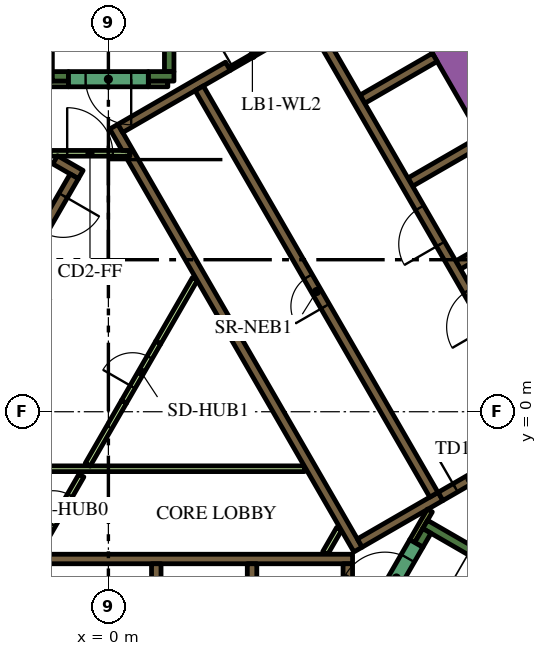
"""IFC4 building model, lengths in metres.
Left out: names, types, materials, properties, quantities, classifications, styles, units other than length and angle.
Written with IfcOpenShell. Run it as: python <this file> out.ifc"""

import sys

from ifc_helpers import new_model, si_unit, direction, frame, frame_2d, origin, place, context, subcontext, project, spatial, polyline, rectangle, outline, extrude, element, fill, save


model = new_model("IFC4")
c1 = context("Model", 3, precision=1e-05, world=origin(), true_north=direction((0.0, 1.0)))
c2 = subcontext(c1, "Body", "Model", "MODEL_VIEW")
j1 = project(units=[si_unit("LENGTHUNIT", "METRE"), si_unit("PLANEANGLEUNIT", "RADIAN")], contexts=[c1])
p1 = place(None, origin())
s1 = spatial("IfcSite", under=j1, at=p1, CompositionType="ELEMENT")
p2 = place(p1, origin())
s2 = spatial("IfcBuilding", under=s1, at=p2, CompositionType="ELEMENT")
p3 = place(p2, frame((0.0, 0.0, 99.3)))
s3 = spatial("IfcBuildingStorey", under=s2, at=p3, CompositionType="ELEMENT", Elevation=99.3)
p4 = place(p3, frame((6.776, 13.364, 0.0), z_axis=(0.0, 0.0, 1.0), x_axis=(0.500004177138, -0.8660229921, 0.0)))
e1 = element("IfcWall", 1, at=p4, inside=s3, PredefinedType="SOLIDWALL", context=c2, shape_type="SweptSolid", body=[
    extrude(rectangle(XDim=20.204, YDim=0.9, at=frame_2d((10.102, 0.0))), origin(), (0.0, 0.0, 1.0), 3.9),
])
p5 = place(p3, frame((8.334, -2.964, 0.0), z_axis=(0.0, 0.0, 1.0), x_axis=(0.866016039709, -0.500016218704, 0.0)))
e2 = element("IfcWall", 2, at=p5, inside=s3, PredefinedType="SOLIDWALL", context=c2, shape_type="SweptSolid", body=[
    extrude(rectangle(XDim=7.05, YDim=0.25, at=frame_2d((3.525, 0.0))), origin(), (0.0, 0.0, 1.0), 3.9),
])
p6 = place(p3, frame((8.168, -3.503, 0.0), z_axis=(0.0, 0.0, 1.0), x_axis=(0.49972245349, 0.866185586049, 0.0)))
e3 = element("IfcWall", 3, at=p6, inside=s3, PredefinedType="SOLIDWALL", context=c2, shape_type="SweptSolid", body=[
    extrude(rectangle(XDim=0.425, YDim=0.25, at=frame_2d((0.212, 0.0))), origin(), (0.0, 0.0, 1.0), 3.9),
])
p7 = place(p3, frame((1.6, 8.95, 0.0), z_axis=(0.0, 0.0, 1.0), x_axis=(0.0, 1.0, 0.0)))
e4 = element("IfcWall", 4, at=p7, inside=s3, PredefinedType="SOLIDWALL", context=c2, shape_type="SweptSolid", body=[
    extrude(rectangle(XDim=6.8, YDim=0.25, at=frame_2d((3.4, 0.0))), origin(), (0.0, 0.0, 1.0), 3.9),
])
p8 = place(p3, frame((1.05, 8.825, 0.0), z_axis=(0.0, 0.0, 1.0), x_axis=(1.0, 0.0, 0.0)))
e5 = element("IfcWall", 5, at=p8, inside=s3, PredefinedType="SOLIDWALL", context=c2, shape_type="SweptSolid", body=[
    extrude(rectangle(XDim=0.675, YDim=0.25, at=frame_2d((0.337, 0.0))), origin(), (0.0, 0.0, 1.0), 3.9),
])
p9 = place(p3, frame((-1.6, 8.7, 0.0), z_axis=(0.0, 0.0, 1.0), x_axis=(0.0, 1.0, 0.0)))
e6 = element("IfcWall", 6, at=p9, inside=s3, PredefinedType="SOLIDWALL", context=c2, shape_type="SweptSolid", body=[
    extrude(rectangle(XDim=7.05, YDim=0.25, at=frame_2d((3.525, 0.0))), origin(), (0.0, 0.0, 1.0), 3.9),
])
p10 = place(p3, frame((-1.475, 8.825, 0.0), z_axis=(0.0, 0.0, 1.0), x_axis=(1.0, 0.0, 0.0)))
e7 = element("IfcWall", 7, at=p10, inside=s3, PredefinedType="SOLIDWALL", context=c2, shape_type="SweptSolid", body=[
    extrude(rectangle(XDim=0.425, YDim=0.25, at=frame_2d((0.212, 0.0))), origin(), (0.0, 0.0, 1.0), 3.9),
])
p11 = place(p3, frame((-5.545, -3.875, 0.0), z_axis=(0.0, 0.0, 1.0), x_axis=(1.0, 0.0, 0.0)))
e8 = element("IfcWall", 8, at=p11, inside=s3, PredefinedType="SOLIDWALL", context=c2, shape_type="SweptSolid", body=[
    extrude(rectangle(XDim=11.97, YDim=0.25, at=frame_2d((5.985, 0.0))), origin(), (0.0, 0.0, 1.0), 3.9),
])
p12 = place(p3, frame((6.3, -7.268, 0.0), z_axis=(0.0, 0.0, 1.0), x_axis=(0.0, 1.0, 0.0)))
e9 = element("IfcWall", 9, at=p12, inside=s3, PredefinedType="SOLIDWALL", context=c2, shape_type="SweptSolid", body=[
    extrude(rectangle(XDim=3.268, YDim=0.25, at=frame_2d((1.634, 0.0))), origin(), (0.0, 0.0, 1.0), 3.9),
])
for number, where, z_axis, x_axis in (
    (10, (3.78, -4.0, 0.0), (0.0, 0.0, 1.0), (0.0, -1.0, 0.0)),
    (11, (1.26, -4.0, 0.0), (0.0, 0.0, 1.0), (0.0, -1.0, 0.0)),
):
    element("IfcWall", number, at=place(p3, frame(where, z_axis=z_axis, x_axis=x_axis)), inside=s3, PredefinedType="SOLIDWALL", context=c2, shape_type="SweptSolid", body=[
        extrude(rectangle(XDim=2.2, YDim=0.25, at=frame_2d((1.1, 0.0))), origin(), (0.0, 0.0, 1.0), 3.9),
    ])
p13 = place(p3, origin())
e12 = element("IfcWall", 12, at=p13, inside=s3, PredefinedType="SOLIDWALL", context=c2, shape_type="SweptSolid", body=[
    extrude(outline(polyline([(0.566, 6.725), (0.566, 6.875), (0.566, 6.875), (0.565, 6.875), (0.361, 6.875), (0.035, 7.439), (0.252, 7.564), (0.377, 7.348), (6.552, -3.348), (6.677, -3.564), (6.46, -3.689), (0.448, 6.725), (0.565, 6.725), (0.566, 6.725), (0.566, 6.725)])), origin(), (0.0, 0.0, 1.0), 3.9),
])
p14 = place(p3, frame((0.314, 7.456, 0.0), z_axis=(0.0, 0.0, 1.0), x_axis=(0.866013897511, 0.50001992892, 0.0)))
e13 = element("IfcWall", 13, at=p14, inside=s3, PredefinedType="SOLIDWALL", context=c2, shape_type="SweptSolid", body=[
    extrude(rectangle(XDim=3.268, YDim=0.25, at=frame_2d((1.634, 0.0))), origin(), (0.0, 0.0, 1.0), 3.9),
])
p15 = place(p3, frame((6.614, -3.456, 0.0), z_axis=(0.0, 0.0, 1.0), x_axis=(0.866031582473, 0.499989298045, 0.0)))
e14 = element("IfcWall", 14, at=p15, inside=s3, PredefinedType="SOLIDWALL", context=c2, shape_type="SweptSolid", body=[
    extrude(rectangle(XDim=2.455, YDim=0.25, at=frame_2d((1.228, 0.0))), origin(), (0.0, 0.0, 1.0), 3.9),
])
for number, where, z_axis, x_axis in (
    (15, (6.684, 8.224, 0.0), (0.0, 0.0, 1.0), (0.866, 0.5, 0.0)),
    (16, (7.944, 6.041, 0.0), (0.0, 0.0, 1.0), (0.866, 0.5, 0.0)),
    (17, (9.204, 3.859, 0.0), (0.0, 0.0, 1.0), (0.866, 0.5, 0.0)),
):
    element("IfcWall", number, at=place(p3, frame(where, z_axis=z_axis, x_axis=x_axis)), inside=s3, PredefinedType="SOLIDWALL", context=c2, shape_type="SweptSolid", body=[
        extrude(rectangle(XDim=2.2, YDim=0.25, at=frame_2d((1.1, 0.0))), origin(), (0.0, 0.0, 1.0), 3.9),
    ])
p16 = place(p3, frame((-0.728, 6.24, 0.0), z_axis=(0.0, 0.0, 1.0), x_axis=(-0.865955664968, 0.500120771724, 0.0)))
e18 = element("IfcWall", 18, at=p16, inside=s3, PredefinedType="SOLIDWALL", context=c2, shape_type="SweptSolid", body=[
    extrude(rectangle(XDim=0.778, YDim=0.25, at=frame_2d((0.389, 0.0))), origin(), (0.0, 0.0, 1.0), 3.9),
])
p17 = place(p3, frame((-2.196, 8.625, 0.0), z_axis=(0.0, 0.0, 1.0), x_axis=(1.0, 0.0, 0.0)))
e19 = element("IfcWall", 19, at=p17, inside=s3, PredefinedType="PARTITIONING", context=c2, shape_type="SweptSolid", body=[
    extrude(rectangle(XDim=1.146, YDim=0.15, at=frame_2d((0.573, 0.0))), origin(), (0.0, 0.0, 1.0), 2.75),
])
p18 = place(p3, frame((5.705, -3.718, 0.0), z_axis=(0.0, 0.0, 1.0), x_axis=(0.499962090823, 0.866047289552, 0.0)))
e20 = element("IfcWall", 20, at=p18, inside=s3, PredefinedType="PARTITIONING", context=c2, shape_type="SweptSolid", body=[
    extrude(rectangle(XDim=0.735, YDim=0.15, at=frame_2d((0.367, 0.0))), origin(), (0.0, 0.0, 1.0), 2.75),
])
p19 = place(p3, frame((8.459, -2.599, 0.0), z_axis=(0.0, 0.0, 1.0), x_axis=(-0.500041054325, -0.866001699761, 0.0)))
e21 = element("IfcWall", 21, at=p19, inside=s3, PredefinedType="PARTITIONING", context=c2, shape_type="SweptSolid", body=[
    extrude(rectangle(XDim=0.929, YDim=0.15, at=frame_2d((0.464, 0.0))), origin(), (0.0, 0.0, 1.0), 3.9),
])
p20 = place(p3, frame((-4.2, -1.5, 0.0), z_axis=(0.0, 0.0, 1.0), x_axis=(1.0, 0.0, 0.0)))
e22 = element("IfcWall", 22, at=p20, inside=s3, PredefinedType="PARTITIONING", context=c2, shape_type="SweptSolid", body=[
    extrude(rectangle(XDim=9.359, YDim=0.15, at=frame_2d((4.68, 0.0))), origin(), (0.0, 0.0, 1.0), 2.75),
])
p21 = place(p3, frame((-0.544, -1.393, 0.0), z_axis=(0.0, 0.0, 1.0), x_axis=(0.499928740635, 0.866066541489, 0.0)))
e23 = element("IfcWall", 23, at=p21, inside=s3, PredefinedType="PARTITIONING", context=c2, shape_type="SweptSolid", body=[
    extrude(rectangle(XDim=1.912, YDim=0.15, at=frame_2d((0.956, 0.0))), origin(), (0.0, 0.0, 1.0), 2.75),
])
p22 = place(p3, frame((1.312, 1.822, 0.0), z_axis=(0.0, 0.0, 1.0), x_axis=(0.500003549559, 0.866023354436, 0.0)))
e24 = element("IfcWall", 24, at=p22, inside=s3, PredefinedType="PARTITIONING", context=c2, shape_type="SweptSolid", body=[
    extrude(rectangle(XDim=1.93, YDim=0.15, at=frame_2d((0.965, 0.0))), origin(), (0.0, 0.0, 1.0), 2.75),
])
p23 = place(p3, frame((1.05, 8.625, 0.0), z_axis=(0.0, 0.0, 1.0), x_axis=(1.0, 0.0, 0.0)))
e25 = element("IfcWall", 25, at=p23, inside=s3, PredefinedType="PARTITIONING", context=c2, shape_type="SweptSolid", body=[
    extrude(rectangle(XDim=0.514, YDim=0.15, at=frame_2d((0.257, 0.0))), origin(), (0.0, 0.0, 1.0), 2.75),
])
p24 = place(p3, frame((11.553, -0.46, 0.0), z_axis=(0.0, 0.0, 1.0), x_axis=(-0.500006514828, 0.866021642414, 0.0)))
e26 = element("IfcWall", 26, at=p24, inside=s3, PredefinedType="SOLIDWALL", context=c2, shape_type="SweptSolid", body=[
    extrude(rectangle(XDim=12.35, YDim=0.25, at=frame_2d((6.175, 0.0))), origin(), (0.0, 0.0, 1.0), 3.9),
])
p25 = place(p24, frame((0.585, 0.0, 0.0)))
e27 = element("IfcOpeningElement", 27, at=p25, cuts=e26, PredefinedType="OPENING", context=c2, shape_type="SweptSolid", body=[
    extrude(rectangle(XDim=1.1, YDim=2.1, at=frame_2d((0.55, 1.05))), frame((0.0, 0.135, 0.0), z_axis=(0.0, -1.0, 0.0), x_axis=(1.0, 0.0, 0.0)), (0.0, 0.0, 1.0), 0.27),
])
p26 = place(p24, frame((3.105, 0.0, 0.0)))
e28 = element("IfcOpeningElement", 28, at=p26, cuts=e26, PredefinedType="OPENING", context=c2, shape_type="SweptSolid", body=[
    extrude(rectangle(XDim=1.1, YDim=2.1, at=frame_2d((0.55, 1.05))), frame((0.0, 0.135, 0.0), z_axis=(0.0, -1.0, 0.0), x_axis=(1.0, 0.0, 0.0)), (0.0, 0.0, 1.0), 0.27),
])
p27 = place(p24, frame((5.625, 0.0, 0.0)))
e29 = element("IfcOpeningElement", 29, at=p27, cuts=e26, PredefinedType="OPENING", context=c2, shape_type="SweptSolid", body=[
    extrude(rectangle(XDim=1.1, YDim=2.1, at=frame_2d((0.55, 1.05))), frame((0.0, 0.135, 0.0), z_axis=(0.0, -1.0, 0.0), x_axis=(1.0, 0.0, 0.0)), (0.0, 0.0, 1.0), 0.27),
])
p28 = place(p3, frame((8.565, -2.185, 0.0), z_axis=(0.0, 0.0, 1.0), x_axis=(-0.499997954832, 0.866026584559, 0.0)))
e30 = element("IfcWall", 30, at=p28, inside=s3, PredefinedType="SOLIDWALL", context=c2, shape_type="SweptSolid", body=[
    extrude(rectangle(XDim=12.35, YDim=0.25, at=frame_2d((6.175, 0.0))), origin(), (0.0, 0.0, 1.0), 3.9),
])
p29 = place(p28, frame((5.725, 0.0, 0.0)))
e31 = element("IfcOpeningElement", 31, at=p29, cuts=e30, PredefinedType="OPENING", context=c2, shape_type="SweptSolid", body=[
    extrude(rectangle(XDim=0.9, YDim=2.1, at=frame_2d((0.45, 1.05))), frame((0.0, 0.135, 0.0), z_axis=(0.0, -1.0, 0.0), x_axis=(1.0, 0.0, 0.0)), (0.0, 0.0, 1.0), 0.27),
])
p30 = place(p3, frame((-0.898, 6.194, 0.0), z_axis=(0.0, 0.0, 1.0), x_axis=(-0.499996202215, -0.866027596426, 0.0)))
e32 = element("IfcWall", 32, at=p30, inside=s3, PredefinedType="SOLIDWALL", context=c2, shape_type="SweptSolid", body=[
    extrude(rectangle(XDim=9.83, YDim=0.25, at=frame_2d((4.915, 0.0))), origin(), (0.0, 0.0, 1.0), 3.9),
])
p31 = place(p30, frame((0.585, 0.0, 0.0)))
e33 = element("IfcOpeningElement", 33, at=p31, cuts=e32, PredefinedType="OPENING", context=c2, shape_type="SweptSolid", body=[
    extrude(rectangle(XDim=1.1, YDim=2.1, at=frame_2d((0.55, 1.05))), frame((0.0, 0.135, 0.0), z_axis=(0.0, -1.0, 0.0), x_axis=(1.0, 0.0, 0.0)), (0.0, 0.0, 1.0), 0.27),
])
p32 = place(p30, frame((3.105, 0.0, 0.0)))
e34 = element("IfcOpeningElement", 34, at=p32, cuts=e32, PredefinedType="OPENING", context=c2, shape_type="SweptSolid", body=[
    extrude(rectangle(XDim=1.1, YDim=2.1, at=frame_2d((0.55, 1.05))), frame((0.0, 0.135, 0.0), z_axis=(0.0, -1.0, 0.0), x_axis=(1.0, 0.0, 0.0)), (0.0, 0.0, 1.0), 0.27),
])
p33 = place(p30, frame((5.625, 0.0, 0.0)))
e35 = element("IfcOpeningElement", 35, at=p33, cuts=e32, PredefinedType="OPENING", context=c2, shape_type="SweptSolid", body=[
    extrude(rectangle(XDim=1.1, YDim=2.1, at=frame_2d((0.55, 1.05))), frame((0.0, 0.135, 0.0), z_axis=(0.0, -1.0, 0.0), x_axis=(1.0, 0.0, 0.0)), (0.0, 0.0, 1.0), 0.27),
])
p34 = place(p30, frame((8.145, 0.0, 0.0)))
e36 = element("IfcOpeningElement", 36, at=p34, cuts=e32, PredefinedType="OPENING", context=c2, shape_type="SweptSolid", body=[
    extrude(rectangle(XDim=1.1, YDim=2.1, at=frame_2d((0.55, 1.05))), frame((0.0, 0.135, 0.0), z_axis=(0.0, -1.0, 0.0), x_axis=(1.0, 0.0, 0.0)), (0.0, 0.0, 1.0), 0.27),
])
p35 = place(p3, frame((7.053, -5.284, 0.0), z_axis=(0.0, 0.0, 1.0), x_axis=(0.500078061341, 0.865980330357, 0.0)))
e37 = element("IfcWall", 37, at=p35, inside=s3, PredefinedType="SOLIDWALL", context=c2, shape_type="SweptSolid", body=[
    extrude(rectangle(XDim=2.1, YDim=0.4, at=frame_2d((1.05, 0.0))), origin(), (0.0, 0.0, 1.0), 3.9),
])
p36 = place(p35, frame((0.45, 0.0, 0.0)))
e38 = element("IfcOpeningElement", 38, at=p36, cuts=e37, PredefinedType="OPENING", context=c2, shape_type="SweptSolid", body=[
    extrude(rectangle(XDim=1.2, YDim=2.1, at=frame_2d((0.6, 1.05))), frame((0.0, 0.21, 0.0), z_axis=(0.0, -1.0, 0.0), x_axis=(1.0, 0.0, 0.0)), (0.0, 0.0, 1.0), 0.42),
])
p37 = place(p3, frame((8.74, -2.229, 0.0), z_axis=(0.0, 0.0, 1.0), x_axis=(0.865989075817, 0.500062916607, 0.0)))
e39 = element("IfcWall", 39, at=p37, inside=s3, PredefinedType="SOLIDWALL", context=c2, shape_type="SweptSolid", body=[
    extrude(rectangle(XDim=1.8, YDim=0.25, at=frame_2d((0.9, 0.0))), origin(), (0.0, 0.0, 1.0), 3.9),
])
p38 = place(p37, frame((0.45, 0.0, 0.0)))
e40 = element("IfcOpeningElement", 40, at=p38, cuts=e39, PredefinedType="OPENING", context=c2, shape_type="SweptSolid", body=[
    extrude(rectangle(XDim=0.9, YDim=2.1, at=frame_2d((0.45, 1.05))), frame((0.0, 0.135, 0.0), z_axis=(0.0, -1.0, 0.0), x_axis=(1.0, 0.0, 0.0)), (0.0, 0.0, 1.0), 0.27),
])
p39 = place(p3, frame((1.05, 8.75, 0.0), z_axis=(0.0, 0.0, 1.0), x_axis=(-1.0, 0.0, 0.0)))
e41 = element("IfcWall", 41, at=p39, inside=s3, PredefinedType="SOLIDWALL", context=c2, shape_type="SweptSolid", body=[
    extrude(rectangle(XDim=2.1, YDim=0.4, at=frame_2d((1.05, 0.0))), origin(), (0.0, 0.0, 1.0), 3.9),
])
p40 = place(p39, frame((0.45, 0.0, 0.0)))
e42 = element("IfcOpeningElement", 42, at=p40, cuts=e41, PredefinedType="OPENING", context=c2, shape_type="SweptSolid", body=[
    extrude(rectangle(XDim=1.2, YDim=2.1, at=frame_2d((0.6, 1.05))), frame((0.0, 0.21, 0.0), z_axis=(0.0, -1.0, 0.0), x_axis=(1.0, 0.0, 0.0)), (0.0, 0.0, 1.0), 0.42),
])
p41 = place(p3, frame((-1.76, -3.498, 0.0), z_axis=(0.0, 0.0, 1.0), x_axis=(0.499977374825, 0.866038466041, 0.0)))
e43 = element("IfcWall", 43, at=p41, inside=s3, PredefinedType="PARTITIONING", context=c2, shape_type="SweptSolid", body=[
    extrude(rectangle(XDim=2.1, YDim=0.15, at=frame_2d((1.05, 0.0))), origin(), (0.0, 0.0, 1.0), 2.75),
])
p42 = place(p41, frame((0.6, 0.0, 0.0)))
e44 = element("IfcOpeningElement", 44, at=p42, cuts=e43, PredefinedType="OPENING", context=c2, shape_type="SweptSolid", body=[
    extrude(rectangle(XDim=0.9, YDim=2.1, at=frame_2d((0.45, 1.05))), frame((0.0, 0.085, 0.0), z_axis=(0.0, -1.0, 0.0), x_axis=(1.0, 0.0, 0.0)), (0.0, 0.0, 1.0), 0.17),
])
p43 = place(p3, frame((-1.534, 6.8, 0.0), z_axis=(0.0, 0.0, 1.0), x_axis=(1.0, 0.0, 0.0)))
e45 = element("IfcWall", 45, at=p43, inside=s3, PredefinedType="PARTITIONING", context=c2, shape_type="SweptSolid", body=[
    extrude(rectangle(XDim=2.1, YDim=0.15, at=frame_2d((1.05, 0.0))), origin(), (0.0, 0.0, 1.0), 2.75),
])
p44 = place(p43, frame((0.45, 0.0, 0.0)))
e46 = element("IfcOpeningElement", 46, at=p44, cuts=e45, PredefinedType="OPENING", context=c2, shape_type="SweptSolid", body=[
    extrude(rectangle(XDim=1.2, YDim=2.1, at=frame_2d((0.6, 1.05))), frame((0.0, 0.085, 0.0), z_axis=(0.0, -1.0, 0.0), x_axis=(1.0, 0.0, 0.0)), (0.0, 0.0, 1.0), 0.17),
])
p45 = place(p3, frame((3.183, 9.02, 0.0), z_axis=(0.0, 0.0, 1.0), x_axis=(0.866034573852, 0.49998411664, 0.0)))
e47 = element("IfcWall", 47, at=p45, inside=s3, PredefinedType="PARTITIONING", context=c2, shape_type="SweptSolid", body=[
    extrude(rectangle(XDim=1.4, YDim=0.09, at=frame_2d((0.7, 0.0))), origin(), (0.0, 0.0, 1.0), 2.75),
])
p46 = place(p45, frame((0.1, 0.0, 0.0)))
e48 = element("IfcOpeningElement", 48, at=p46, cuts=e47, PredefinedType="OPENING", context=c2, shape_type="SweptSolid", body=[
    extrude(rectangle(XDim=1.2, YDim=2.1, at=frame_2d((0.6, 1.05))), frame((0.0, 0.055, 0.0), z_axis=(0.0, -1.0, 0.0), x_axis=(1.0, 0.0, 0.0)), (0.0, 0.0, 1.0), 0.11),
])
p47 = place(p3, frame((0.412, 0.263, 0.0), z_axis=(0.0, 0.0, 1.0), x_axis=(0.500062916607, 0.865989075817, 0.0)))
e49 = element("IfcWall", 49, at=p47, inside=s3, PredefinedType="PARTITIONING", context=c2, shape_type="SweptSolid", body=[
    extrude(rectangle(XDim=1.8, YDim=0.15, at=frame_2d((0.9, 0.0))), origin(), (0.0, 0.0, 1.0), 2.75),
])
p48 = place(p47, frame((0.45, 0.0, 0.0)))
e50 = element("IfcOpeningElement", 50, at=p48, cuts=e49, PredefinedType="OPENING", context=c2, shape_type="SweptSolid", body=[
    extrude(rectangle(XDim=0.9, YDim=2.1, at=frame_2d((0.45, 1.05))), frame((0.0, 0.085, 0.0), z_axis=(0.0, -1.0, 0.0), x_axis=(1.0, 0.0, 0.0)), (0.0, 0.0, 1.0), 0.17),
])
p49 = place(p3, frame((6.163, 18.475, 0.0), z_axis=(0.0, 0.0, 1.0), x_axis=(0.500001317485, -0.866024643133, 0.0)))
e51 = element("IfcWall", 51, at=p49, inside=s3, PredefinedType="PARTITIONING", context=c2, shape_type="SweptSolid", body=[
    extrude(rectangle(XDim=25.767, YDim=0.15, at=frame_2d((12.883, 0.0))), origin(), (0.0, 0.0, 1.0), 2.75),
])
p50 = place(p49, frame((24.241, 0.0, 0.0)))
e52 = element("IfcOpeningElement", 52, at=p50, cuts=e51, PredefinedType="OPENING", context=c2, shape_type="SweptSolid", body=[
    extrude(rectangle(XDim=1.0, YDim=2.1, at=frame_2d((0.5, 1.05))), frame((0.0, 0.085, 0.0), z_axis=(0.0, -1.0, 0.0), x_axis=(1.0, 0.0, 0.0)), (0.0, 0.0, 1.0), 0.17),
])
p51 = place(p49, frame((13.144, 0.0, 0.0)))
e53 = element("IfcOpeningElement", 53, at=p51, cuts=e51, PredefinedType="OPENING", context=c2, shape_type="SweptSolid", body=[
    extrude(rectangle(XDim=1.0, YDim=2.1, at=frame_2d((0.5, 1.05))), frame((0.0, 0.085, 0.0), z_axis=(0.0, -1.0, 0.0), x_axis=(1.0, 0.0, 0.0)), (0.0, 0.0, 1.0), 0.17),
])
p52 = place(p49, frame((11.592, 0.0, 0.0)))
e54 = element("IfcOpeningElement", 54, at=p52, cuts=e51, PredefinedType="OPENING", context=c2, shape_type="SweptSolid", body=[
    extrude(rectangle(XDim=1.1, YDim=2.1, at=frame_2d((0.55, 1.05))), frame((0.0, 0.085, 0.0), z_axis=(0.0, -1.0, 0.0), x_axis=(1.0, 0.0, 0.0)), (0.0, 0.0, 1.0), 0.17),
])
p53 = place(p49, frame((4.674, 0.0, 0.0)))
e55 = element("IfcOpeningElement", 55, at=p53, cuts=e51, PredefinedType="OPENING", context=c2, shape_type="SweptSolid", body=[
    extrude(rectangle(XDim=0.9, YDim=2.1, at=frame_2d((0.45, 1.05))), frame((0.0, 0.085, 0.0), z_axis=(0.0, -1.0, 0.0), x_axis=(1.0, 0.0, 0.0)), (0.0, 0.0, 1.0), 0.17),
])
p54 = place(p49, frame((2.411, 0.0, 0.0)))
e56 = element("IfcOpeningElement", 56, at=p54, cuts=e51, PredefinedType="OPENING", context=c2, shape_type="SweptSolid", body=[
    extrude(rectangle(XDim=1.0, YDim=2.1, at=frame_2d((0.5, 1.05))), frame((0.0, 0.085, 0.0), z_axis=(0.0, -1.0, 0.0), x_axis=(1.0, 0.0, 0.0)), (0.0, 0.0, 1.0), 0.17),
])
p55 = place(p26, origin())
e57 = element("IfcDoor", 57, at=p55, inside=s3, OperationType="DOUBLE_DOOR_SLIDING", PredefinedType="DOOR", context=c2, shape_type="SweptSolid", body=[
    extrude(rectangle(XDim=1.1, YDim=2.1, at=frame_2d((0.55, 1.05))), frame((0.0, 0.025, 0.0), z_axis=(0.0, -1.0, 0.0), x_axis=(1.0, 0.0, 0.0)), (0.0, 0.0, 1.0), 0.05),
])
fill(e28, e57)
p56 = place(p27, origin())
e58 = element("IfcDoor", 58, at=p56, inside=s3, OperationType="DOUBLE_DOOR_SLIDING", PredefinedType="DOOR", context=c2, shape_type="SweptSolid", body=[
    extrude(rectangle(XDim=1.1, YDim=2.1, at=frame_2d((0.55, 1.05))), frame((0.0, 0.025, 0.0), z_axis=(0.0, -1.0, 0.0), x_axis=(1.0, 0.0, 0.0)), (0.0, 0.0, 1.0), 0.05),
])
fill(e29, e58)
p57 = place(p29, origin())
e59 = element("IfcDoor", 59, at=p57, inside=s3, OperationType="SINGLE_SWING_LEFT", PredefinedType="DOOR", context=c2, shape_type="SweptSolid", body=[
    extrude(rectangle(XDim=0.9, YDim=2.1, at=frame_2d((0.45, 1.05))), frame((0.0, 0.025, 0.0), z_axis=(0.0, -1.0, 0.0), x_axis=(1.0, 0.0, 0.0)), (0.0, 0.0, 1.0), 0.05),
])
fill(e31, e59)
p58 = place(p31, origin())
e60 = element("IfcDoor", 60, at=p58, inside=s3, OperationType="DOUBLE_DOOR_SLIDING", PredefinedType="DOOR", context=c2, shape_type="SweptSolid", body=[
    extrude(rectangle(XDim=1.1, YDim=2.1, at=frame_2d((0.55, 1.05))), frame((0.0, 0.025, 0.0), z_axis=(0.0, -1.0, 0.0), x_axis=(1.0, 0.0, 0.0)), (0.0, 0.0, 1.0), 0.05),
])
fill(e33, e60)
p59 = place(p36, origin())
e61 = element("IfcDoor", 61, at=p59, inside=s3, OperationType="SINGLE_SWING_LEFT", PredefinedType="DOOR", context=c2, shape_type="SweptSolid", body=[
    extrude(rectangle(XDim=1.2, YDim=2.1, at=frame_2d((0.6, 1.05))), frame((0.0, 0.025, 0.0), z_axis=(0.0, -1.0, 0.0), x_axis=(1.0, 0.0, 0.0)), (0.0, 0.0, 1.0), 0.05),
])
fill(e38, e61)
p60 = place(p38, origin())
e62 = element("IfcDoor", 62, at=p60, inside=s3, OperationType="SINGLE_SWING_LEFT", PredefinedType="DOOR", context=c2, shape_type="SweptSolid", body=[
    extrude(rectangle(XDim=0.9, YDim=2.1, at=frame_2d((0.45, 1.05))), frame((0.0, 0.025, 0.0), z_axis=(0.0, -1.0, 0.0), x_axis=(1.0, 0.0, 0.0)), (0.0, 0.0, 1.0), 0.05),
])
fill(e40, e62)
p61 = place(p40, origin())
e63 = element("IfcDoor", 63, at=p61, inside=s3, OperationType="SINGLE_SWING_LEFT", PredefinedType="DOOR", context=c2, shape_type="SweptSolid", body=[
    extrude(rectangle(XDim=1.2, YDim=2.1, at=frame_2d((0.6, 1.05))), frame((0.0, 0.025, 0.0), z_axis=(0.0, -1.0, 0.0), x_axis=(1.0, 0.0, 0.0)), (0.0, 0.0, 1.0), 0.05),
])
fill(e42, e63)
p62 = place(p42, origin())
e64 = element("IfcDoor", 64, at=p62, inside=s3, OperationType="SINGLE_SWING_LEFT", PredefinedType="DOOR", context=c2, shape_type="SweptSolid", body=[
    extrude(rectangle(XDim=0.9, YDim=2.1, at=frame_2d((0.45, 1.05))), frame((0.0, 0.025, 0.0), z_axis=(0.0, -1.0, 0.0), x_axis=(1.0, 0.0, 0.0)), (0.0, 0.0, 1.0), 0.05),
])
fill(e44, e64)
p63 = place(p44, origin())
e65 = element("IfcDoor", 65, at=p63, inside=s3, OperationType="SINGLE_SWING_LEFT", PredefinedType="DOOR", context=c2, shape_type="SweptSolid", body=[
    extrude(rectangle(XDim=1.2, YDim=2.1, at=frame_2d((0.6, 1.05))), frame((0.0, 0.025, 0.0), z_axis=(0.0, -1.0, 0.0), x_axis=(1.0, 0.0, 0.0)), (0.0, 0.0, 1.0), 0.05),
])
fill(e46, e65)
p64 = place(p46, origin())
e66 = element("IfcDoor", 66, at=p64, inside=s3, OperationType="SINGLE_SWING_LEFT", PredefinedType="DOOR", context=c2, shape_type="SweptSolid", body=[
    extrude(rectangle(XDim=1.2, YDim=2.1, at=frame_2d((0.6, 1.05))), frame((0.0, 0.025, 0.0), z_axis=(0.0, -1.0, 0.0), x_axis=(1.0, 0.0, 0.0)), (0.0, 0.0, 1.0), 0.05),
])
fill(e48, e66)
p65 = place(p48, origin())
e67 = element("IfcDoor", 67, at=p65, inside=s3, OperationType="SINGLE_SWING_LEFT", PredefinedType="DOOR", context=c2, shape_type="SweptSolid", body=[
    extrude(rectangle(XDim=0.9, YDim=2.1, at=frame_2d((0.45, 1.05))), frame((0.0, 0.025, 0.0), z_axis=(0.0, -1.0, 0.0), x_axis=(1.0, 0.0, 0.0)), (0.0, 0.0, 1.0), 0.05),
])
fill(e50, e67)
save(model, sys.argv[1])
